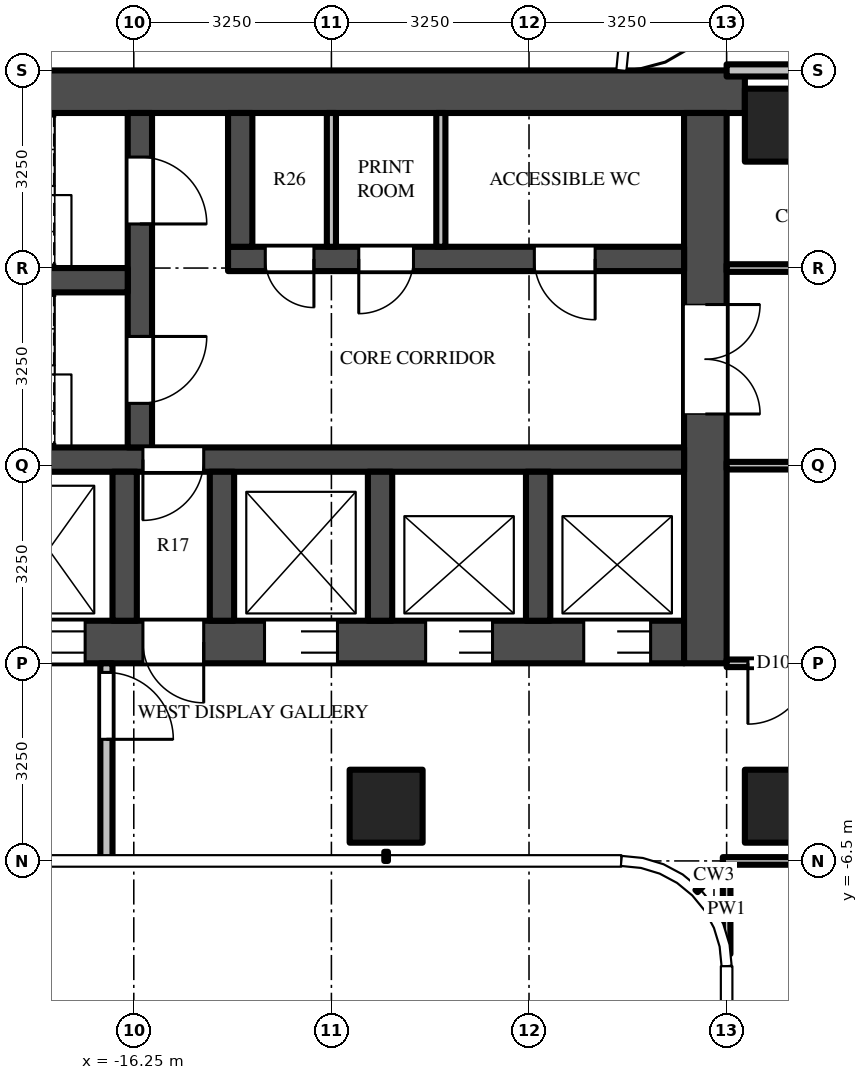
"""IFC4 building model, lengths in metres.
Left out: names, types, materials, properties, quantities, classifications, styles, units other than length and angle.
Written with IfcOpenShell. Run it as: python <this file> out.ifc"""

import sys

from ifc_helpers import new_model, si_unit, direction, frame, frame_2d, origin, origin_2d, place, context, subcontext, project, spatial, rectangle, extrude, source, transform, mapped, element, fill, save


model = new_model("IFC4")
c1 = context("Model", 3, precision=1e-05, world=origin(), true_north=direction((0.0, 1.0)))
c2 = subcontext(c1, "Body", "Model", "MODEL_VIEW")
j1 = project(units=[si_unit("LENGTHUNIT", "METRE"), si_unit("PLANEANGLEUNIT", "RADIAN")], contexts=[c1])
p1 = place(None, origin())
s1 = spatial("IfcSite", under=j1, at=p1, CompositionType="ELEMENT")
p2 = place(p1, origin())
s2 = spatial("IfcBuilding", under=s1, at=p2, CompositionType="ELEMENT")
p3 = place(p2, frame((0.0, 0.0, 181.5)))
s3 = spatial("IfcBuildingStorey", under=s2, at=p3, CompositionType="ELEMENT", Elevation=181.5)
m1 = source(origin(), c2, "Body", "SweptSolid", [
    extrude(rectangle(XDim=1.2, YDim=1.2, at=origin_2d()), origin(), (0.0, 0.0, 1.0), 3.9),
])
for number, where, z_axis, x_axis in (
    (1, (-5.6, 5.6, 0.0), (0.0, 0.0, 1.0), (1.0, 0.0, 0.0)),
    (2, (-5.6, -5.6, 0.0), (0.0, 0.0, 1.0), (1.0, 0.0, 0.0)),
    (3, (-12.1, -5.6, 0.0), (0.0, 0.0, 1.0), (1.0, 0.0, 0.0)),
):
    element("IfcColumn", number, at=place(p3, frame(where, z_axis=z_axis, x_axis=x_axis)), inside=s3, PredefinedType="COLUMN", context=c2, shape_type="MappedRepresentation", body=[
        mapped(m1, transform((0.0, 0.0, 0.0))),
    ])
m2 = source(origin(), c2, "Body", "SweptSolid", [
    extrude(rectangle(XDim=16.55, YDim=0.7, at=frame_2d((8.275, 0.0))), origin(), (0.0, 0.0, 1.0), 3.7),
])
p4 = place(p3, frame((-6.2, 6.15, 0.0), z_axis=(0.0, 0.0, 1.0), x_axis=(-1.0, 0.0, 0.0)))
e4 = element("IfcWall", 4, at=p4, inside=s3, PredefinedType="SHEAR", context=c2, shape_type="MappedRepresentation", body=[
    mapped(m2, transform((0.0, 0.0, 0.0))),
])
m3 = source(origin(), c2, "Body", "SweptSolid", [
    extrude(rectangle(XDim=14.85, YDim=0.7, at=frame_2d((7.425, 0.0))), origin(), (0.0, 0.0, 1.0), 3.7),
])
p5 = place(p3, frame((-7.2, -2.9, 0.0), z_axis=(0.0, 0.0, 1.0), x_axis=(-1.0, 0.0, 0.0)))
e5 = element("IfcWall", 5, at=p5, inside=s3, PredefinedType="SHEAR", context=c2, shape_type="MappedRepresentation", body=[
    mapped(m3, transform((0.0, 0.0, 0.0))),
])
m4 = source(origin(), c2, "Body", "SweptSolid", [
    extrude(rectangle(XDim=1.1, YDim=2.1, at=frame_2d((0.55, 1.05))), frame((0.0, 0.36, 0.0), z_axis=(0.0, -1.0, 0.0), x_axis=(1.0, 0.0, 0.0)), (0.0, 0.0, 1.0), 0.72),
])
p6 = place(p5, frame((0.55, 0.0, 0.0)))
e6 = element("IfcOpeningElement", 6, at=p6, cuts=e5, PredefinedType="OPENING", context=c2, shape_type="MappedRepresentation", body=[
    mapped(m4, transform((0.0, 0.0, 0.0))),
])
p7 = place(p5, frame((3.15, 0.0, 0.0)))
e7 = element("IfcOpeningElement", 7, at=p7, cuts=e5, PredefinedType="OPENING", context=c2, shape_type="MappedRepresentation", body=[
    mapped(m4, transform((0.0, 0.0, 0.0))),
])
m5 = source(origin(), c2, "Body", "SweptSolid", [
    extrude(rectangle(XDim=1.2, YDim=2.1, at=frame_2d((0.6, 1.05))), frame((0.0, 0.36, 0.0), z_axis=(0.0, -1.0, 0.0), x_axis=(1.0, 0.0, 0.0)), (0.0, 0.0, 1.0), 0.72),
])
p8 = place(p5, frame((5.7, 0.0, 0.0)))
e8 = element("IfcOpeningElement", 8, at=p8, cuts=e5, PredefinedType="OPENING", context=c2, shape_type="MappedRepresentation", body=[
    mapped(m5, transform((0.0, 0.0, 0.0))),
])
m6 = source(origin(), c2, "Body", "SweptSolid", [
    extrude(rectangle(XDim=1.3, YDim=2.1, at=frame_2d((0.65, 1.05))), frame((0.0, 0.36, 0.0), z_axis=(0.0, -1.0, 0.0), x_axis=(1.0, 0.0, 0.0)), (0.0, 0.0, 1.0), 0.72),
])
p9 = place(p5, frame((12.2, 0.0, 0.0)))
e9 = element("IfcOpeningElement", 9, at=p9, cuts=e5, PredefinedType="OPENING", context=c2, shape_type="MappedRepresentation", body=[
    mapped(m6, transform((0.0, 0.0, 0.0))),
])
p10 = place(p5, frame((9.85, 0.0, 0.0)))
e10 = element("IfcOpeningElement", 10, at=p10, cuts=e5, PredefinedType="OPENING", context=c2, shape_type="MappedRepresentation", body=[
    mapped(m5, transform((0.0, 0.0, 0.0))),
])
m7 = source(origin(), c2, "Body", "SweptSolid", [
    extrude(rectangle(XDim=1.0, YDim=2.1, at=frame_2d((0.5, 1.05))), frame((0.0, 0.36, 0.0), z_axis=(0.0, -1.0, 0.0), x_axis=(1.0, 0.0, 0.0)), (0.0, 0.0, 1.0), 0.72),
])
p11 = place(p5, frame((7.9, 0.0, 0.0)))
e11 = element("IfcOpeningElement", 11, at=p11, cuts=e5, PredefinedType="OPENING", context=c2, shape_type="MappedRepresentation", body=[
    mapped(m7, transform((0.0, 0.0, 0.0))),
])
m8 = source(origin(), c2, "Body", "SweptSolid", [
    extrude(rectangle(XDim=9.05, YDim=0.7, at=frame_2d((4.525, 0.0))), origin(), (0.0, 0.0, 1.0), 3.7),
])
p12 = place(p3, frame((-6.85, 5.8, 0.0), z_axis=(0.0, 0.0, 1.0), x_axis=(0.0, -1.0, 0.0)))
e12 = element("IfcWall", 12, at=p12, inside=s3, PredefinedType="SHEAR", context=c2, shape_type="MappedRepresentation", body=[
    mapped(m8, transform((0.0, 0.0, 0.0))),
])
m9 = source(origin(), c2, "Body", "SweptSolid", [
    extrude(rectangle(XDim=1.8, YDim=2.1, at=frame_2d((0.9, 1.05))), frame((0.0, 0.36, 0.0), z_axis=(0.0, -1.0, 0.0), x_axis=(1.0, 0.0, 0.0)), (0.0, 0.0, 1.0), 0.72),
])
p13 = place(p12, frame((3.15, 0.0, 0.0)))
e13 = element("IfcOpeningElement", 13, at=p13, cuts=e12, PredefinedType="OPENING", context=c2, shape_type="MappedRepresentation", body=[
    mapped(m9, transform((0.0, 0.0, 0.0))),
])
m10 = source(origin(), c2, "Body", "SweptSolid", [
    extrude(rectangle(XDim=7.5, YDim=0.4, at=frame_2d((3.75, 0.0))), origin(), (0.0, 0.0, 1.0), 3.7),
])
p14 = place(p3, frame((-7.2, 3.4, 0.0), z_axis=(0.0, 0.0, 1.0), x_axis=(-1.0, 0.0, 0.0)))
e14 = element("IfcWall", 14, at=p14, inside=s3, PredefinedType="SHEAR", context=c2, shape_type="MappedRepresentation", body=[
    mapped(m10, transform((0.0, 0.0, 0.0))),
])
m11 = source(origin(), c2, "Body", "SweptSolid", [
    extrude(rectangle(XDim=1.0, YDim=2.1, at=frame_2d((0.5, 1.05))), frame((0.0, 0.21, 0.0), z_axis=(0.0, -1.0, 0.0), x_axis=(1.0, 0.0, 0.0)), (0.0, 0.0, 1.0), 0.42),
])
p15 = place(p14, frame((1.462, 0.0, 0.0)))
e15 = element("IfcOpeningElement", 15, at=p15, cuts=e14, PredefinedType="OPENING", context=c2, shape_type="MappedRepresentation", body=[
    mapped(m11, transform((0.0, 0.0, 0.0))),
])
m12 = source(origin(), c2, "Body", "SweptSolid", [
    extrude(rectangle(XDim=0.9, YDim=2.1, at=frame_2d((0.45, 1.05))), frame((0.0, 0.21, 0.0), z_axis=(0.0, -1.0, 0.0), x_axis=(1.0, 0.0, 0.0)), (0.0, 0.0, 1.0), 0.42),
])
p16 = place(p14, frame((4.45, 0.0, 0.0)))
e16 = element("IfcOpeningElement", 16, at=p16, cuts=e14, PredefinedType="OPENING", context=c2, shape_type="MappedRepresentation", body=[
    mapped(m12, transform((0.0, 0.0, 0.0))),
])
m13 = source(origin(), c2, "Body", "SweptSolid", [
    extrude(rectangle(XDim=0.8, YDim=2.1, at=frame_2d((0.4, 1.05))), frame((0.0, 0.21, 0.0), z_axis=(0.0, -1.0, 0.0), x_axis=(1.0, 0.0, 0.0)), (0.0, 0.0, 1.0), 0.42),
])
p17 = place(p14, frame((6.087, 0.0, 0.0)))
e17 = element("IfcOpeningElement", 17, at=p17, cuts=e14, PredefinedType="OPENING", context=c2, shape_type="MappedRepresentation", body=[
    mapped(m13, transform((0.0, 0.0, 0.0))),
])
m14 = source(origin(), c2, "Body", "SweptSolid", [
    extrude(rectangle(XDim=14.85, YDim=0.4, at=frame_2d((7.425, 0.0))), origin(), (0.0, 0.0, 1.0), 3.7),
])
p18 = place(p3, frame((-7.2, 0.1, 0.0), z_axis=(0.0, 0.0, 1.0), x_axis=(-1.0, 0.0, 0.0)))
e18 = element("IfcWall", 18, at=p18, inside=s3, PredefinedType="SHEAR", context=c2, shape_type="MappedRepresentation", body=[
    mapped(m14, transform((0.0, 0.0, 0.0))),
])
p19 = place(p18, frame((7.9, 0.0, 0.0)))
e19 = element("IfcOpeningElement", 19, at=p19, cuts=e18, PredefinedType="OPENING", context=c2, shape_type="MappedRepresentation", body=[
    mapped(m11, transform((0.0, 0.0, 0.0))),
])
m15 = source(origin(), c2, "Body", "SweptSolid", [
    extrude(rectangle(XDim=5.5, YDim=0.4, at=frame_2d((2.75, 0.0))), origin(), (0.0, 0.0, 1.0), 3.7),
])
p20 = place(p3, frame((-16.15, 5.8, 0.0), z_axis=(0.0, 0.0, 1.0), x_axis=(0.0, -1.0, 0.0)))
e20 = element("IfcWall", 20, at=p20, inside=s3, PredefinedType="SHEAR", context=c2, shape_type="MappedRepresentation", body=[
    mapped(m15, transform((0.0, 0.0, 0.0))),
])
m16 = source(origin(), c2, "Body", "SweptSolid", [
    extrude(rectangle(XDim=1.1, YDim=2.1, at=frame_2d((0.55, 1.05))), frame((0.0, 0.21, 0.0), z_axis=(0.0, -1.0, 0.0), x_axis=(1.0, 0.0, 0.0)), (0.0, 0.0, 1.0), 0.42),
])
p21 = place(p20, frame((0.725, 0.0, 0.0)))
e21 = element("IfcOpeningElement", 21, at=p21, cuts=e20, PredefinedType="OPENING", context=c2, shape_type="MappedRepresentation", body=[
    mapped(m16, transform((0.0, 0.0, 0.0))),
])
p22 = place(p20, frame((3.675, 0.0, 0.0)))
e22 = element("IfcOpeningElement", 22, at=p22, cuts=e20, PredefinedType="OPENING", context=c2, shape_type="MappedRepresentation", body=[
    mapped(m16, transform((0.0, 0.0, 0.0))),
])
m17 = source(origin(), c2, "Body", "SweptSolid", [
    extrude(rectangle(XDim=5.7, YDim=0.4, at=frame_2d((2.85, 0.0))), origin(), (0.0, 0.0, 1.0), 3.7),
])
p23 = place(p3, frame((-16.35, 3.05, 0.0), z_axis=(0.0, 0.0, 1.0), x_axis=(-1.0, 0.0, 0.0)))
e23 = element("IfcWall", 23, at=p23, inside=s3, PredefinedType="SHEAR", context=c2, shape_type="MappedRepresentation", body=[
    mapped(m17, transform((0.0, 0.0, 0.0))),
])
m18 = source(origin(), c2, "Body", "SweptSolid", [
    extrude(rectangle(XDim=2.2, YDim=0.4, at=frame_2d((1.1, 0.0))), origin(), (0.0, 0.0, 1.0), 3.7),
])
p24 = place(p3, frame((-14.5, 5.8, 0.0), z_axis=(0.0, 0.0, 1.0), x_axis=(0.0, -1.0, 0.0)))
e24 = element("IfcWall", 24, at=p24, inside=s3, PredefinedType="SHEAR", context=c2, shape_type="MappedRepresentation", body=[
    mapped(m18, transform((0.0, 0.0, 0.0))),
])
m19 = source(origin(), c2, "Body", "SweptSolid", [
    extrude(rectangle(XDim=2.45, YDim=0.4, at=frame_2d((1.225, 0.0))), origin(), (0.0, 0.0, 1.0), 3.7),
])
for number, where, z_axis, x_axis in (
    (25, (-9.6, -0.1, 0.0), (0.0, 0.0, 1.0), (0.0, -1.0, 0.0)),
    (26, (-12.2, -0.1, 0.0), (0.0, 0.0, 1.0), (0.0, -1.0, 0.0)),
    (27, (-14.8, -0.1, 0.0), (0.0, 0.0, 1.0), (0.0, -1.0, 0.0)),
    (28, (-16.4, -0.1, 0.0), (0.0, 0.0, 1.0), (0.0, -1.0, 0.0)),
):
    element("IfcWall", number, at=place(p3, frame(where, z_axis=z_axis, x_axis=x_axis)), inside=s3, PredefinedType="SHEAR", context=c2, shape_type="MappedRepresentation", body=[
        mapped(m19, transform((0.0, 0.0, 0.0))),
    ])
m20 = source(origin(), c2, "Body", "SweptSolid", [
    extrude(rectangle(XDim=3.25, YDim=0.2, at=frame_2d((1.625, 0.0))), origin(), (0.0, 0.0, 1.0), 3.7),
])
p25 = place(p3, frame((-16.7, -3.25, 0.0), z_axis=(0.0, 0.0, 1.0), x_axis=(0.0, -1.0, 0.0)))
e29 = element("IfcWall", 29, at=p25, inside=s3, PredefinedType="PARTITIONING", context=c2, shape_type="MappedRepresentation", body=[
    mapped(m20, transform((0.0, 0.0, 0.0))),
])
m21 = source(origin(), c2, "Body", "SweptSolid", [
    extrude(rectangle(XDim=1.1, YDim=2.1, at=frame_2d((0.55, 1.05))), frame((0.0, 0.11, 0.0), z_axis=(0.0, -1.0, 0.0), x_axis=(1.0, 0.0, 0.0)), (0.0, 0.0, 1.0), 0.22),
])
p26 = place(p25, frame((0.15, 0.0, 0.0)))
e30 = element("IfcOpeningElement", 30, at=p26, cuts=e29, PredefinedType="OPENING", context=c2, shape_type="MappedRepresentation", body=[
    mapped(m21, transform((0.0, 0.0, 0.0))),
])
m22 = source(origin(), c2, "Body", "SweptSolid", [
    extrude(rectangle(XDim=2.2, YDim=0.15, at=frame_2d((1.1, 0.0))), origin(), (0.0, 0.0, 1.0), 3.7),
])
for number, where, z_axis, x_axis in (
    (31, (-11.2, 5.8, 0.0), (0.0, 0.0, 1.0), (0.0, -1.0, 0.0)),
    (32, (-13.0, 5.8, 0.0), (0.0, 0.0, 1.0), (0.0, -1.0, 0.0)),
):
    element("IfcWall", number, at=place(p3, frame(where, z_axis=z_axis, x_axis=x_axis)), inside=s3, PredefinedType="PARTITIONING", context=c2, shape_type="MappedRepresentation", body=[
        mapped(m22, transform((0.0, 0.0, 0.0))),
    ])
m23 = source(origin(), c2, "Body", "SweptSolid", [
    extrude(rectangle(XDim=1.469, YDim=0.125, at=frame_2d((0.734, 0.0))), origin(), (0.0, 0.0, 1.0), 3.7),
])
p27 = place(p3, frame((-6.5, -6.562, 0.0), z_axis=(0.0, 0.0, 1.0), x_axis=(0.0, -1.0, 0.0)))
e33 = element("IfcWall", 33, at=p27, inside=s3, PredefinedType="PARTITIONING", context=c2, shape_type="MappedRepresentation", body=[
    mapped(m23, transform((0.0, 0.0, 0.0))),
])
m24 = source(origin(), c2, "Body", "SweptSolid", [
    extrude(rectangle(XDim=5.425, YDim=0.125, at=frame_2d((2.712, 0.0))), origin(), (0.0, 0.0, 1.0), 2.78),
])
p28 = place(p3, frame((-1.137, -6.5, 0.0), z_axis=(0.0, 0.0, 1.0), x_axis=(-1.0, 0.0, 0.0)))
e34 = element("IfcWall", 34, at=p28, inside=s3, PredefinedType="PARTITIONING", context=c2, shape_type="MappedRepresentation", body=[
    mapped(m24, transform((0.0, 0.0, 0.0))),
])
m25 = source(origin(), c2, "Body", "SweptSolid", [
    extrude(rectangle(XDim=1.0, YDim=2.1, at=frame_2d((0.5, 1.05))), frame((0.0, 0.073, 0.0), z_axis=(0.0, -1.0, 0.0), x_axis=(1.0, 0.0, 0.0)), (0.0, 0.0, 1.0), 0.145),
])
p29 = place(p28, frame((2.812, 0.0, 0.0)))
e35 = element("IfcOpeningElement", 35, at=p29, cuts=e34, PredefinedType="OPENING", context=c2, shape_type="MappedRepresentation", body=[
    mapped(m25, transform((0.0, 0.0, 0.0))),
])
m26 = source(origin(), c2, "Body", "SweptSolid", [
    extrude(rectangle(XDim=5.363, YDim=0.125, at=frame_2d((2.681, 0.0))), origin(), (0.0, 0.0, 1.0), 2.997),
])
p30 = place(p3, frame((-1.137, -3.25, 0.0), z_axis=(0.0, 0.0, 1.0), x_axis=(-1.0, 0.0, 0.0)))
e36 = element("IfcWall", 36, at=p30, inside=s3, PredefinedType="PARTITIONING", context=c2, shape_type="MappedRepresentation", body=[
    mapped(m26, transform((0.0, 0.0, 0.0))),
])
p31 = place(p30, frame((4.012, 0.0, 0.0)))
e37 = element("IfcOpeningElement", 37, at=p31, cuts=e36, PredefinedType="OPENING", context=c2, shape_type="MappedRepresentation", body=[
    mapped(m25, transform((0.0, 0.0, 0.0))),
])
p32 = place(p3, frame((-1.137, 0.0, 0.0), z_axis=(0.0, 0.0, 1.0), x_axis=(-1.0, 0.0, 0.0)))
e38 = element("IfcWall", 38, at=p32, inside=s3, PredefinedType="PARTITIONING", context=c2, shape_type="MappedRepresentation", body=[
    mapped(m26, transform((0.0, 0.0, 0.0))),
])
p33 = place(p3, frame((-6.5, 3.25, 0.0), z_axis=(0.0, 0.0, 1.0), x_axis=(1.0, 0.0, 0.0)))
e39 = element("IfcWall", 39, at=p33, inside=s3, PredefinedType="PARTITIONING", context=c2, shape_type="MappedRepresentation", body=[
    mapped(m26, transform((0.0, 0.0, 0.0))),
])
p34 = place(p33, frame((3.95, 0.0, 0.0)))
e40 = element("IfcOpeningElement", 40, at=p34, cuts=e39, PredefinedType="OPENING", context=c2, shape_type="MappedRepresentation", body=[
    mapped(m25, transform((0.0, 0.0, 0.0))),
])
m27 = source(origin(), c2, "Body", "SweptSolid", [
    extrude(rectangle(XDim=5.238, YDim=0.2, at=frame_2d((2.619, 0.0))), origin(), (0.0, 0.0, 1.0), 2.78),
])
p35 = place(p3, frame((-6.5, 6.5, 0.0), z_axis=(0.0, 0.0, 1.0), x_axis=(1.0, 0.0, 0.0)))
e41 = element("IfcWall", 41, at=p35, inside=s3, PredefinedType="PARTITIONING", context=c2, shape_type="MappedRepresentation", body=[
    mapped(m27, transform((0.0, 0.0, 0.0))),
])
m28 = source(origin(), c2, "Body", "SweptSolid", [
    extrude(rectangle(XDim=1.1, YDim=2.1, at=frame_2d((0.55, 1.05))), frame((0.0, -0.275, 0.0), z_axis=(0.0, -1.0, 0.0), x_axis=(1.0, 0.0, 0.0)), (0.0, 0.0, 1.0), 0.05),
])
p36 = place(p6, origin())
e42 = element("IfcDoor", 42, at=p36, inside=s3, OperationType="DOUBLE_DOOR_SLIDING", PredefinedType="DOOR", context=c2, shape_type="MappedRepresentation", body=[
    mapped(m28, transform((0.0, 0.0, 0.0))),
])
fill(e6, e42)
p37 = place(p7, origin())
e43 = element("IfcDoor", 43, at=p37, inside=s3, OperationType="DOUBLE_DOOR_SLIDING", PredefinedType="DOOR", context=c2, shape_type="MappedRepresentation", body=[
    mapped(m28, transform((0.0, 0.0, 0.0))),
])
fill(e7, e43)
m29 = source(origin(), c2, "Body", "SweptSolid", [
    extrude(rectangle(XDim=1.2, YDim=2.1, at=frame_2d((0.6, 1.05))), frame((0.0, -0.275, 0.0), z_axis=(0.0, -1.0, 0.0), x_axis=(1.0, 0.0, 0.0)), (0.0, 0.0, 1.0), 0.05),
])
p38 = place(p8, origin())
e44 = element("IfcDoor", 44, at=p38, inside=s3, OperationType="DOUBLE_DOOR_SLIDING", PredefinedType="DOOR", context=c2, shape_type="MappedRepresentation", body=[
    mapped(m29, transform((0.0, 0.0, 0.0))),
])
fill(e8, e44)
p39 = place(p10, origin())
e45 = element("IfcDoor", 45, at=p39, inside=s3, OperationType="DOUBLE_DOOR_SLIDING", PredefinedType="DOOR", context=c2, shape_type="MappedRepresentation", body=[
    mapped(m29, transform((0.0, 0.0, 0.0))),
])
fill(e10, e45)
m30 = source(origin(), c2, "Body", "SweptSolid", [
    extrude(rectangle(XDim=1.8, YDim=2.1, at=frame_2d((0.9, 1.05))), frame((0.0, -0.275, 0.0), z_axis=(0.0, -1.0, 0.0), x_axis=(1.0, 0.0, 0.0)), (0.0, 0.0, 1.0), 0.05),
])
p40 = place(p13, origin())
e46 = element("IfcDoor", 46, at=p40, inside=s3, OperationType="DOUBLE_DOOR_SINGLE_SWING", PredefinedType="DOOR", context=c2, shape_type="MappedRepresentation", body=[
    mapped(m30, transform((0.0, 0.0, 0.0))),
])
fill(e13, e46)
m31 = source(origin(), c2, "Body", "SweptSolid", [
    extrude(rectangle(XDim=1.1, YDim=2.1, at=frame_2d((0.55, 1.05))), frame((0.0, 0.025, 0.0), z_axis=(0.0, -1.0, 0.0), x_axis=(1.0, 0.0, 0.0)), (0.0, 0.0, 1.0), 0.05),
])
p41 = place(p21, origin())
e47 = element("IfcDoor", 47, at=p41, inside=s3, OperationType="SINGLE_SWING_RIGHT", PredefinedType="DOOR", context=c2, shape_type="MappedRepresentation", body=[
    mapped(m31, transform((0.0, 0.0, 0.0))),
])
fill(e21, e47)
p42 = place(p22, origin())
e48 = element("IfcDoor", 48, at=p42, inside=s3, OperationType="SINGLE_SWING_LEFT", PredefinedType="DOOR", context=c2, shape_type="MappedRepresentation", body=[
    mapped(m31, transform((0.0, 0.0, 0.0))),
])
fill(e22, e48)
m32 = source(origin(), c2, "Body", "SweptSolid", [
    extrude(rectangle(XDim=1.0, YDim=2.1, at=frame_2d((0.5, 1.05))), frame((0.0, 0.025, 0.0), z_axis=(0.0, -1.0, 0.0), x_axis=(1.0, 0.0, 0.0)), (0.0, 0.0, 1.0), 0.05),
])
p43 = place(p19, origin())
e49 = element("IfcDoor", 49, at=p43, inside=s3, OperationType="SINGLE_SWING_RIGHT", PredefinedType="DOOR", context=c2, shape_type="MappedRepresentation", body=[
    mapped(m32, transform((0.0, 0.0, 0.0))),
])
fill(e19, e49)
m33 = source(origin(), c2, "Body", "SweptSolid", [
    extrude(rectangle(XDim=1.0, YDim=2.1, at=frame_2d((0.5, 1.05))), frame((0.0, -0.275, 0.0), z_axis=(0.0, -1.0, 0.0), x_axis=(1.0, 0.0, 0.0)), (0.0, 0.0, 1.0), 0.05),
])
p44 = place(p11, origin())
e50 = element("IfcDoor", 50, at=p44, inside=s3, OperationType="SINGLE_SWING_LEFT", PredefinedType="DOOR", context=c2, shape_type="MappedRepresentation", body=[
    mapped(m33, transform((0.0, 0.0, 0.0))),
])
fill(e11, e50)
p45 = place(p26, origin())
e51 = element("IfcDoor", 51, at=p45, inside=s3, OperationType="SINGLE_SWING_RIGHT", PredefinedType="DOOR", context=c2, shape_type="MappedRepresentation", body=[
    mapped(m31, transform((0.0, 0.0, 0.0))),
])
fill(e30, e51)
p46 = place(p15, origin())
e52 = element("IfcDoor", 52, at=p46, inside=s3, OperationType="SINGLE_SWING_LEFT", PredefinedType="DOOR", context=c2, shape_type="MappedRepresentation", body=[
    mapped(m32, transform((0.0, 0.0, 0.0))),
])
fill(e15, e52)
m34 = source(origin(), c2, "Body", "SweptSolid", [
    extrude(rectangle(XDim=0.9, YDim=2.1, at=frame_2d((0.45, 1.05))), frame((0.0, 0.025, 0.0), z_axis=(0.0, -1.0, 0.0), x_axis=(1.0, 0.0, 0.0)), (0.0, 0.0, 1.0), 0.05),
])
p47 = place(p16, origin())
e53 = element("IfcDoor", 53, at=p47, inside=s3, OperationType="SINGLE_SWING_RIGHT", PredefinedType="DOOR", context=c2, shape_type="MappedRepresentation", body=[
    mapped(m34, transform((0.0, 0.0, 0.0))),
])
fill(e16, e53)
m35 = source(origin(), c2, "Body", "SweptSolid", [
    extrude(rectangle(XDim=0.8, YDim=2.1, at=frame_2d((0.4, 1.05))), frame((0.0, 0.025, 0.0), z_axis=(0.0, -1.0, 0.0), x_axis=(1.0, 0.0, 0.0)), (0.0, 0.0, 1.0), 0.05),
])
p48 = place(p17, origin())
e54 = element("IfcDoor", 54, at=p48, inside=s3, OperationType="SINGLE_SWING_LEFT", PredefinedType="DOOR", context=c2, shape_type="MappedRepresentation", body=[
    mapped(m35, transform((0.0, 0.0, 0.0))),
])
fill(e17, e54)
p49 = place(p31, origin())
e55 = element("IfcDoor", 55, at=p49, inside=s3, OperationType="SINGLE_SWING_RIGHT", PredefinedType="DOOR", context=c2, shape_type="MappedRepresentation", body=[
    mapped(m32, transform((0.0, 0.0, 0.0))),
])
fill(e37, e55)
save(model, sys.argv[1])
